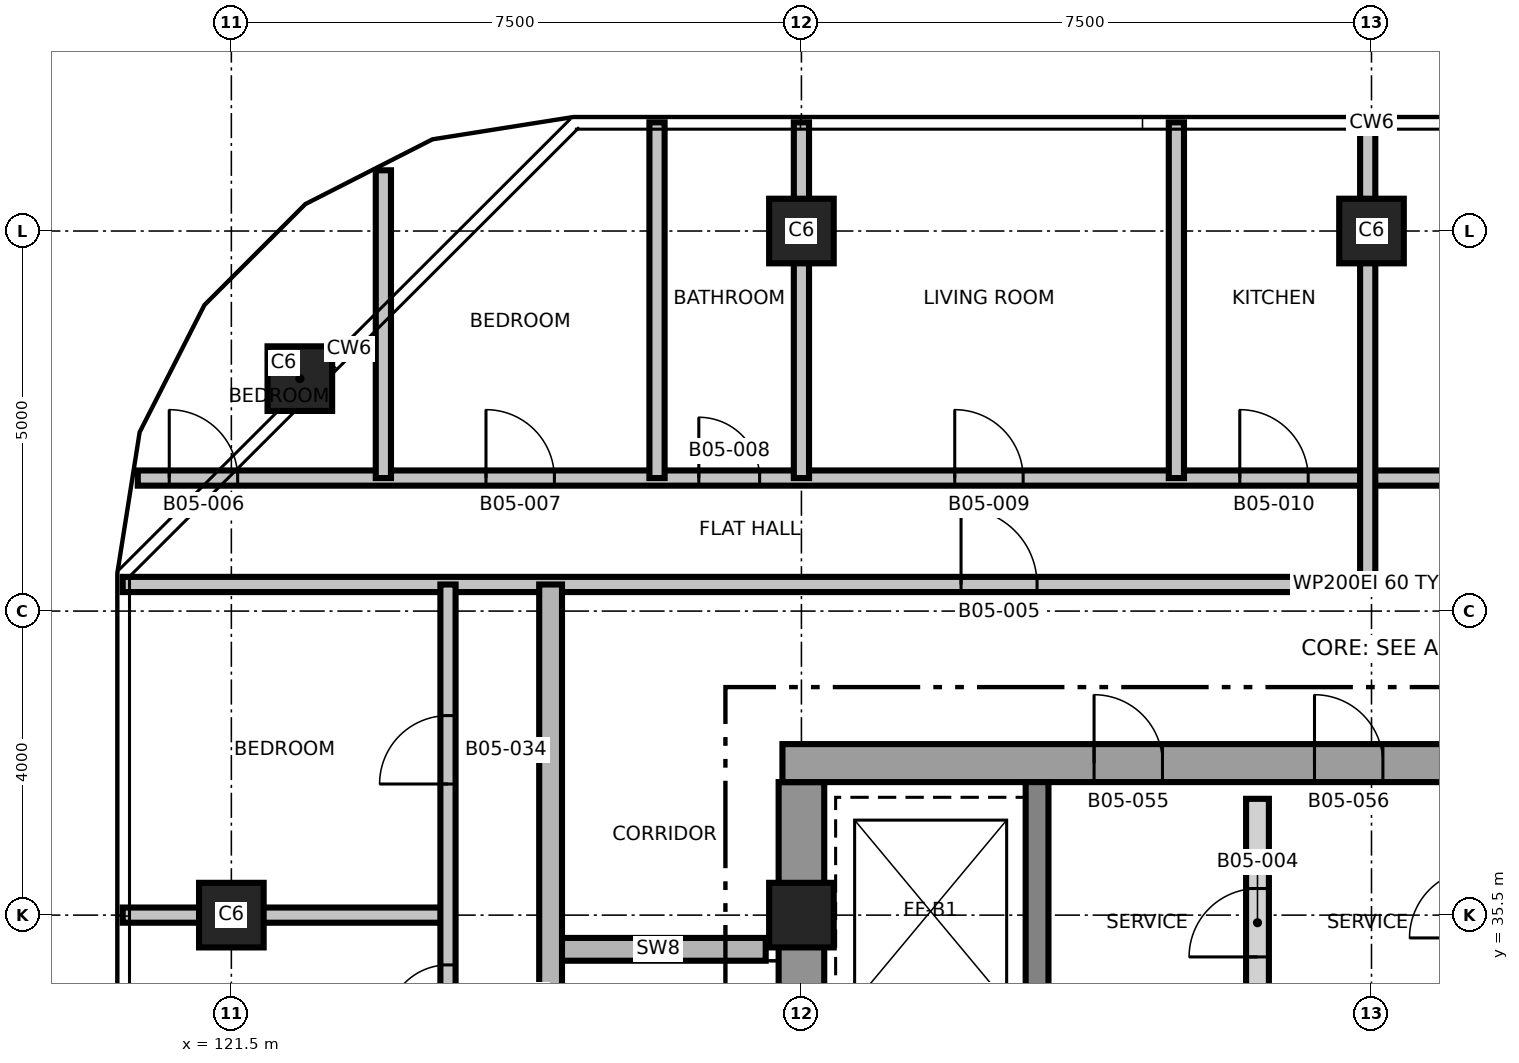
"""IFC4 building model, lengths in metres.
Left out: names, types, materials, properties, quantities, classifications, styles, units other than length and angle.
Written with IfcOpenShell. Run it as: python <this file> out.ifc"""

import sys

from ifc_helpers import new_model, si_unit, direction, frame, frame_2d, origin, origin_2d, place, context, subcontext, project, spatial, rectangle, extrude, element, fill, save


model = new_model("IFC4")
c1 = context("Model", 3, precision=1e-05, world=origin(), true_north=direction((0.0, 1.0)))
c2 = subcontext(c1, "Body", "Model", "MODEL_VIEW")
j1 = project(units=[si_unit("LENGTHUNIT", "METRE"), si_unit("PLANEANGLEUNIT", "RADIAN")], contexts=[c1])
p1 = place(None, origin())
s1 = spatial("IfcSite", under=j1, at=p1, CompositionType="ELEMENT")
p2 = place(p1, origin())
s2 = spatial("IfcBuilding", under=s1, at=p2, CompositionType="ELEMENT")
p3 = place(p2, frame((0.0, 0.0, 74.2)))
s3 = spatial("IfcBuildingStorey", under=s2, at=p3, CompositionType="ELEMENT", Elevation=74.2)
p4 = place(p3, frame((129.0, 24.75, 0.0), z_axis=(0.0, 0.0, 1.0), x_axis=(0.0, 1.0, 0.0)))
e1 = element("IfcWall", 1, at=p4, inside=s3, PredefinedType="SHEAR", context=c2, shape_type="SweptSolid", body=[
    extrude(rectangle(XDim=12.5, YDim=0.6, at=frame_2d((6.25, 0.0))), origin(), (0.0, 0.0, 1.0), 3.7),
])
p5 = place(p4, frame((5.15, 0.0, 0.0)))
e2 = element("IfcOpeningElement", 2, at=p5, cuts=e1, PredefinedType="OPENING", context=c2, shape_type="SweptSolid", body=[
    extrude(rectangle(XDim=1.0, YDim=2.1, at=frame_2d((0.5, 1.05))), frame((0.0, 0.31, 0.0), z_axis=(0.0, -1.0, 0.0), x_axis=(1.0, 0.0, 0.0)), (0.0, 0.0, 1.0), 0.62),
])
p6 = place(p3, frame((128.75, 37.5, 0.0), z_axis=(0.0, 0.0, 1.0), x_axis=(1.0, 0.0, 0.0)))
e3 = element("IfcWall", 3, at=p6, inside=s3, PredefinedType="SHEAR", context=c2, shape_type="SweptSolid", body=[
    extrude(rectangle(XDim=15.0, YDim=0.5, at=frame_2d((7.5, 0.0))), origin(), (0.0, 0.0, 1.0), 3.7),
])
p7 = place(p6, frame((9.65, 0.0, 0.0)))
e4 = element("IfcOpeningElement", 4, at=p7, cuts=e3, PredefinedType="OPENING", context=c2, shape_type="SweptSolid", body=[
    extrude(rectangle(XDim=1.5, YDim=2.1, at=frame_2d((0.75, 1.05))), frame((0.0, 0.26, 0.0), z_axis=(0.0, -1.0, 0.0), x_axis=(1.0, 0.0, 0.0)), (0.0, 0.0, 1.0), 0.52),
])
p8 = place(p6, frame((12.85, 0.0, 0.0)))
e5 = element("IfcOpeningElement", 5, at=p8, cuts=e3, PredefinedType="OPENING", context=c2, shape_type="SweptSolid", body=[
    extrude(rectangle(XDim=0.9, YDim=2.1, at=frame_2d((0.45, 1.05))), frame((0.0, 0.26, 0.0), z_axis=(0.0, -1.0, 0.0), x_axis=(1.0, 0.0, 0.0)), (0.0, 0.0, 1.0), 0.52),
])
p9 = place(p6, frame((4.1, 0.0, 0.0)))
e6 = element("IfcOpeningElement", 6, at=p9, cuts=e3, PredefinedType="OPENING", context=c2, shape_type="SweptSolid", body=[
    extrude(rectangle(XDim=0.9, YDim=2.1, at=frame_2d((0.45, 1.05))), frame((0.0, 0.26, 0.0), z_axis=(0.0, -1.0, 0.0), x_axis=(1.0, 0.0, 0.0)), (0.0, 0.0, 1.0), 0.52),
])
p10 = place(p6, frame((7.0, 0.0, 0.0)))
e7 = element("IfcOpeningElement", 7, at=p10, cuts=e3, PredefinedType="OPENING", context=c2, shape_type="SweptSolid", body=[
    extrude(rectangle(XDim=0.9, YDim=2.1, at=frame_2d((0.45, 1.05))), frame((0.0, 0.26, 0.0), z_axis=(0.0, -1.0, 0.0), x_axis=(1.0, 0.0, 0.0)), (0.0, 0.0, 1.0), 0.52),
])
p11 = place(p3, frame((132.1, 24.75, 0.0), z_axis=(0.0, 0.0, 1.0), x_axis=(0.0, 1.0, 0.0)))
e8 = element("IfcWall", 8, at=p11, inside=s3, PredefinedType="SHEAR", context=c2, shape_type="SweptSolid", body=[
    extrude(rectangle(XDim=12.5, YDim=0.3, at=frame_2d((6.25, 0.0))), origin(), (0.0, 0.0, 1.0), 3.7),
])
p12 = place(p11, frame((3.9, 0.0, 0.0)))
e9 = element("IfcOpeningElement", 9, at=p12, cuts=e8, PredefinedType="OPENING", context=c2, shape_type="SweptSolid", body=[
    extrude(rectangle(XDim=1.2, YDim=2.1, at=frame_2d((0.6, 1.05))), frame((0.0, 0.16, 0.0), z_axis=(0.0, -1.0, 0.0), x_axis=(1.0, 0.0, 0.0)), (0.0, 0.0, 1.0), 0.32),
])
for number, where, z_axis, x_axis in (
    (10, (121.5, 35.5, 0.0), (0.0, 0.0, 1.0), (1.0, 0.0, 0.0)),
    (11, (129.0, 35.5, 0.0), (0.0, 0.0, 1.0), (1.0, 0.0, 0.0)),
    (12, (122.401, 42.558, 0.0), (0.0, 0.0, 1.0), (1.0, 0.0, 0.0)),
    (13, (129.0, 44.5, 0.0), (0.0, 0.0, 1.0), (1.0, 0.0, 0.0)),
    (14, (136.5, 44.5, 0.0), (0.0, 0.0, 1.0), (1.0, 0.0, 0.0)),
):
    element("IfcColumn", number, at=place(p3, frame(where, z_axis=z_axis, x_axis=x_axis)), inside=s3, PredefinedType="COLUMN", context=c2, shape_type="SweptSolid", body=[
        extrude(rectangle(XDim=0.85, YDim=0.85, at=origin_2d()), origin(), (0.0, 0.0, 1.0), 3.7),
    ])
p13 = place(p3, frame((125.7, 35.05, 0.0), z_axis=(0.0, 0.0, 1.0), x_axis=(1.0, 0.0, 0.0)))
e15 = element("IfcWall", 15, at=p13, inside=s3, PredefinedType="SHEAR", context=c2, shape_type="SweptSolid", body=[
    extrude(rectangle(XDim=2.83, YDim=0.3, at=frame_2d((1.415, 0.0))), origin(), (0.0, 0.0, 1.0), 3.4),
])
p14 = place(p3, frame((120.07, 35.5, 0.0), z_axis=(0.0, 0.0, 1.0), x_axis=(1.0, 0.0, 0.0)))
e16 = element("IfcWall", 16, at=p14, inside=s3, PredefinedType="PARTITIONING", context=c2, shape_type="SweptSolid", body=[
    extrude(rectangle(XDim=4.28, YDim=0.2, at=frame_2d((2.14, 0.0))), origin(), (0.0, 0.0, 1.0), 3.4),
])
p15 = place(p3, frame((120.07, 39.85, 0.0), z_axis=(0.0, 0.0, 1.0), x_axis=(1.0, 0.0, 0.0)))
e17 = element("IfcWall", 17, at=p15, inside=s3, PredefinedType="PARTITIONING", context=c2, shape_type="SweptSolid", body=[
    extrude(rectangle(XDim=32.86, YDim=0.2, at=frame_2d((16.43, 0.0))), origin(), (0.0, 0.0, 1.0), 3.4),
])
p16 = place(p15, frame((11.03, 0.0, 0.0)))
e18 = element("IfcOpeningElement", 18, at=p16, cuts=e17, PredefinedType="OPENING", context=c2, shape_type="SweptSolid", body=[
    extrude(rectangle(XDim=1.0, YDim=2.1, at=frame_2d((0.5, 1.05))), frame((0.0, 0.11, 0.0), z_axis=(0.0, -1.0, 0.0), x_axis=(1.0, 0.0, 0.0)), (0.0, 0.0, 1.0), 0.22),
])
p17 = place(p15, frame((20.83, 0.0, 0.0)))
e19 = element("IfcOpeningElement", 19, at=p17, cuts=e17, PredefinedType="OPENING", context=c2, shape_type="SweptSolid", body=[
    extrude(rectangle(XDim=1.0, YDim=2.1, at=frame_2d((0.5, 1.05))), frame((0.0, 0.11, 0.0), z_axis=(0.0, -1.0, 0.0), x_axis=(1.0, 0.0, 0.0)), (0.0, 0.0, 1.0), 0.22),
])
p18 = place(p3, frame((120.269, 41.25, 0.0), z_axis=(0.0, 0.0, 1.0), x_axis=(1.0, 0.0, 0.0)))
e20 = element("IfcWall", 20, at=p18, inside=s3, PredefinedType="PARTITIONING", context=c2, shape_type="SweptSolid", body=[
    extrude(rectangle(XDim=32.462, YDim=0.2, at=frame_2d((16.231, 0.0))), origin(), (0.0, 0.0, 1.0), 3.4),
])
p19 = place(p18, frame((0.414, 0.0, 0.0)))
e21 = element("IfcOpeningElement", 21, at=p19, cuts=e20, PredefinedType="OPENING", context=c2, shape_type="SweptSolid", body=[
    extrude(rectangle(XDim=0.9, YDim=2.1, at=frame_2d((0.45, 1.05))), frame((0.0, 0.11, 0.0), z_axis=(0.0, -1.0, 0.0), x_axis=(1.0, 0.0, 0.0)), (0.0, 0.0, 1.0), 0.22),
])
p20 = place(p18, frame((4.581, 0.0, 0.0)))
e22 = element("IfcOpeningElement", 22, at=p20, cuts=e20, PredefinedType="OPENING", context=c2, shape_type="SweptSolid", body=[
    extrude(rectangle(XDim=0.9, YDim=2.1, at=frame_2d((0.45, 1.05))), frame((0.0, 0.11, 0.0), z_axis=(0.0, -1.0, 0.0), x_axis=(1.0, 0.0, 0.0)), (0.0, 0.0, 1.0), 0.22),
])
p21 = place(p18, frame((7.381, 0.0, 0.0)))
e23 = element("IfcOpeningElement", 23, at=p21, cuts=e20, PredefinedType="OPENING", context=c2, shape_type="SweptSolid", body=[
    extrude(rectangle(XDim=0.8, YDim=2.1, at=frame_2d((0.4, 1.05))), frame((0.0, 0.11, 0.0), z_axis=(0.0, -1.0, 0.0), x_axis=(1.0, 0.0, 0.0)), (0.0, 0.0, 1.0), 0.22),
])
p22 = place(p18, frame((10.748, 0.0, 0.0)))
e24 = element("IfcOpeningElement", 24, at=p22, cuts=e20, PredefinedType="OPENING", context=c2, shape_type="SweptSolid", body=[
    extrude(rectangle(XDim=0.9, YDim=2.1, at=frame_2d((0.45, 1.05))), frame((0.0, 0.11, 0.0), z_axis=(0.0, -1.0, 0.0), x_axis=(1.0, 0.0, 0.0)), (0.0, 0.0, 1.0), 0.22),
])
p23 = place(p18, frame((14.498, 0.0, 0.0)))
e25 = element("IfcOpeningElement", 25, at=p23, cuts=e20, PredefinedType="OPENING", context=c2, shape_type="SweptSolid", body=[
    extrude(rectangle(XDim=0.9, YDim=2.1, at=frame_2d((0.45, 1.05))), frame((0.0, 0.11, 0.0), z_axis=(0.0, -1.0, 0.0), x_axis=(1.0, 0.0, 0.0)), (0.0, 0.0, 1.0), 0.22),
])
p24 = place(p18, frame((18.248, 0.0, 0.0)))
e26 = element("IfcOpeningElement", 26, at=p24, cuts=e20, PredefinedType="OPENING", context=c2, shape_type="SweptSolid", body=[
    extrude(rectangle(XDim=0.9, YDim=2.1, at=frame_2d((0.45, 1.05))), frame((0.0, 0.11, 0.0), z_axis=(0.0, -1.0, 0.0), x_axis=(1.0, 0.0, 0.0)), (0.0, 0.0, 1.0), 0.22),
])
p25 = place(p18, frame((21.998, 0.0, 0.0)))
e27 = element("IfcOpeningElement", 27, at=p25, cuts=e20, PredefinedType="OPENING", context=c2, shape_type="SweptSolid", body=[
    extrude(rectangle(XDim=0.9, YDim=2.1, at=frame_2d((0.45, 1.05))), frame((0.0, 0.11, 0.0), z_axis=(0.0, -1.0, 0.0), x_axis=(1.0, 0.0, 0.0)), (0.0, 0.0, 1.0), 0.22),
])
p26 = place(p18, frame((24.842, 0.0, 0.0)))
e28 = element("IfcOpeningElement", 28, at=p26, cuts=e20, PredefinedType="OPENING", context=c2, shape_type="SweptSolid", body=[
    extrude(rectangle(XDim=0.8, YDim=2.1, at=frame_2d((0.4, 1.05))), frame((0.0, 0.11, 0.0), z_axis=(0.0, -1.0, 0.0), x_axis=(1.0, 0.0, 0.0)), (0.0, 0.0, 1.0), 0.22),
])
p27 = place(p18, frame((28.659, 0.0, 0.0)))
e29 = element("IfcOpeningElement", 29, at=p27, cuts=e20, PredefinedType="OPENING", context=c2, shape_type="SweptSolid", body=[
    extrude(rectangle(XDim=0.9, YDim=2.1, at=frame_2d((0.45, 1.05))), frame((0.0, 0.11, 0.0), z_axis=(0.0, -1.0, 0.0), x_axis=(1.0, 0.0, 0.0)), (0.0, 0.0, 1.0), 0.22),
])
p28 = place(p3, frame((123.5, 41.25, 0.0), z_axis=(0.0, 0.0, 1.0), x_axis=(0.0, 1.0, 0.0)))
e30 = element("IfcWall", 30, at=p28, inside=s3, PredefinedType="PARTITIONING", context=c2, shape_type="SweptSolid", body=[
    extrude(rectangle(XDim=4.049, YDim=0.2, at=frame_2d((2.024, 0.0))), origin(), (0.0, 0.0, 1.0), 3.4),
])
p29 = place(p3, frame((124.35, 22.15, 0.0), z_axis=(0.0, 0.0, 1.0), x_axis=(0.0, 1.0, 0.0)))
e31 = element("IfcWall", 31, at=p29, inside=s3, PredefinedType="PARTITIONING", context=c2, shape_type="SweptSolid", body=[
    extrude(rectangle(XDim=17.7, YDim=0.2, at=frame_2d((8.85, 0.0))), origin(), (0.0, 0.0, 1.0), 3.4),
])
p30 = place(p29, frame((1.028, 0.0, 0.0)))
e32 = element("IfcOpeningElement", 32, at=p30, cuts=e31, PredefinedType="OPENING", context=c2, shape_type="SweptSolid", body=[
    extrude(rectangle(XDim=0.9, YDim=2.1, at=frame_2d((0.45, 1.05))), frame((0.0, 0.11, 0.0), z_axis=(0.0, -1.0, 0.0), x_axis=(1.0, 0.0, 0.0)), (0.0, 0.0, 1.0), 0.22),
])
p31 = place(p29, frame((3.253, 0.0, 0.0)))
e33 = element("IfcOpeningElement", 33, at=p31, cuts=e31, PredefinedType="OPENING", context=c2, shape_type="SweptSolid", body=[
    extrude(rectangle(XDim=0.8, YDim=2.1, at=frame_2d((0.4, 1.05))), frame((0.0, 0.11, 0.0), z_axis=(0.0, -1.0, 0.0), x_axis=(1.0, 0.0, 0.0)), (0.0, 0.0, 1.0), 0.22),
])
p32 = place(p29, frame((6.195, 0.0, 0.0)))
e34 = element("IfcOpeningElement", 34, at=p32, cuts=e31, PredefinedType="OPENING", context=c2, shape_type="SweptSolid", body=[
    extrude(rectangle(XDim=0.9, YDim=2.1, at=frame_2d((0.45, 1.05))), frame((0.0, 0.11, 0.0), z_axis=(0.0, -1.0, 0.0), x_axis=(1.0, 0.0, 0.0)), (0.0, 0.0, 1.0), 0.22),
])
p33 = place(p29, frame((9.641, 0.0, 0.0)))
e35 = element("IfcOpeningElement", 35, at=p33, cuts=e31, PredefinedType="OPENING", context=c2, shape_type="SweptSolid", body=[
    extrude(rectangle(XDim=0.9, YDim=2.1, at=frame_2d((0.45, 1.05))), frame((0.0, 0.11, 0.0), z_axis=(0.0, -1.0, 0.0), x_axis=(1.0, 0.0, 0.0)), (0.0, 0.0, 1.0), 0.22),
])
p34 = place(p29, frame((11.895, 0.0, 0.0)))
e36 = element("IfcOpeningElement", 36, at=p34, cuts=e31, PredefinedType="OPENING", context=c2, shape_type="SweptSolid", body=[
    extrude(rectangle(XDim=0.8, YDim=2.1, at=frame_2d((0.4, 1.05))), frame((0.0, 0.11, 0.0), z_axis=(0.0, -1.0, 0.0), x_axis=(1.0, 0.0, 0.0)), (0.0, 0.0, 1.0), 0.22),
])
p35 = place(p29, frame((15.075, 0.0, 0.0)))
e37 = element("IfcOpeningElement", 37, at=p35, cuts=e31, PredefinedType="OPENING", context=c2, shape_type="SweptSolid", body=[
    extrude(rectangle(XDim=0.9, YDim=2.1, at=frame_2d((0.45, 1.05))), frame((0.0, 0.11, 0.0), z_axis=(0.0, -1.0, 0.0), x_axis=(1.0, 0.0, 0.0)), (0.0, 0.0, 1.0), 0.22),
])
p36 = place(p3, frame((125.7, 22.15, 0.0), z_axis=(0.0, 0.0, 1.0), x_axis=(0.0, 1.0, 0.0)))
e38 = element("IfcWall", 38, at=p36, inside=s3, PredefinedType="SHEAR", context=c2, shape_type="SweptSolid", body=[
    extrude(rectangle(XDim=17.7, YDim=0.3, at=frame_2d((8.85, 0.0))), origin(), (0.0, 0.0, 1.0), 3.4),
])
p37 = place(p36, frame((2.7, 0.0, 0.0)))
e39 = element("IfcOpeningElement", 39, at=p37, cuts=e38, PredefinedType="OPENING", context=c2, shape_type="SweptSolid", body=[
    extrude(rectangle(XDim=1.0, YDim=2.1, at=frame_2d((0.5, 1.05))), frame((0.0, 0.16, 0.0), z_axis=(0.0, -1.0, 0.0), x_axis=(1.0, 0.0, 0.0)), (0.0, 0.0, 1.0), 0.32),
])
for number, where, z_axis, x_axis in (
    (40, (127.1, 41.25, 0.0), (0.0, 0.0, 1.0), (0.0, 1.0, 0.0)),
    (41, (129.0, 41.25, 0.0), (0.0, 0.0, 1.0), (0.0, 1.0, 0.0)),
    (42, (133.933, 41.25, 0.0), (0.0, 0.0, 1.0), (0.0, 1.0, 0.0)),
):
    element("IfcWall", number, at=place(p3, frame(where, z_axis=z_axis, x_axis=x_axis)), inside=s3, PredefinedType="PARTITIONING", context=c2, shape_type="SweptSolid", body=[
        extrude(rectangle(XDim=4.68, YDim=0.2, at=frame_2d((2.34, 0.0))), origin(), (0.0, 0.0, 1.0), 3.4),
    ])
p38 = place(p3, frame((135.0, 33.77, 0.0), z_axis=(0.0, 0.0, 1.0), x_axis=(0.0, 1.0, 0.0)))
e43 = element("IfcWall", 43, at=p38, inside=s3, PredefinedType="PARTITIONING", context=c2, shape_type="SweptSolid", body=[
    extrude(rectangle(XDim=3.26, YDim=0.3, at=frame_2d((1.63, 0.0))), origin(), (0.0, 0.0, 1.0), 3.4),
])
p39 = place(p38, frame((1.18, 0.0, 0.0)))
e44 = element("IfcOpeningElement", 44, at=p39, cuts=e43, PredefinedType="OPENING", context=c2, shape_type="SweptSolid", body=[
    extrude(rectangle(XDim=0.9, YDim=2.1, at=frame_2d((0.45, 1.05))), frame((0.0, 0.16, 0.0), z_axis=(0.0, -1.0, 0.0), x_axis=(1.0, 0.0, 0.0)), (0.0, 0.0, 1.0), 0.32),
])
p40 = place(p3, frame((136.45, 39.85, 0.0), z_axis=(0.0, 0.0, 1.0), x_axis=(0.0, 1.0, 0.0)))
e45 = element("IfcWall", 45, at=p40, inside=s3, PredefinedType="PARTITIONING", context=c2, shape_type="SweptSolid", body=[
    extrude(rectangle(XDim=6.08, YDim=0.2, at=frame_2d((3.04, 0.0))), origin(), (0.0, 0.0, 1.0), 3.4),
])
p41 = place(p39, origin())
e46 = element("IfcDoor", 46, at=p41, inside=s3, OperationType="SINGLE_SWING_RIGHT", PredefinedType="DOOR", context=c2, shape_type="SweptSolid", body=[
    extrude(rectangle(XDim=0.9, YDim=2.1, at=frame_2d((0.45, 1.05))), frame((0.0, 0.025, 0.0), z_axis=(0.0, -1.0, 0.0), x_axis=(1.0, 0.0, 0.0)), (0.0, 0.0, 1.0), 0.05),
])
fill(e44, e46)
p42 = place(p16, origin())
e47 = element("IfcDoor", 47, at=p42, inside=s3, OperationType="SINGLE_SWING_LEFT", PredefinedType="DOOR", context=c2, shape_type="SweptSolid", body=[
    extrude(rectangle(XDim=1.0, YDim=2.1, at=frame_2d((0.5, 1.05))), frame((0.0, 0.025, 0.0), z_axis=(0.0, -1.0, 0.0), x_axis=(1.0, 0.0, 0.0)), (0.0, 0.0, 1.0), 0.05),
])
fill(e18, e47)
p43 = place(p19, origin())
e48 = element("IfcDoor", 48, at=p43, inside=s3, OperationType="SINGLE_SWING_RIGHT", PredefinedType="DOOR", context=c2, shape_type="SweptSolid", body=[
    extrude(rectangle(XDim=0.9, YDim=2.1, at=frame_2d((0.45, 1.05))), frame((0.0, 0.025, 0.0), z_axis=(0.0, -1.0, 0.0), x_axis=(1.0, 0.0, 0.0)), (0.0, 0.0, 1.0), 0.05),
])
fill(e21, e48)
p44 = place(p20, origin())
e49 = element("IfcDoor", 49, at=p44, inside=s3, OperationType="SINGLE_SWING_LEFT", PredefinedType="DOOR", context=c2, shape_type="SweptSolid", body=[
    extrude(rectangle(XDim=0.9, YDim=2.1, at=frame_2d((0.45, 1.05))), frame((0.0, 0.025, 0.0), z_axis=(0.0, -1.0, 0.0), x_axis=(1.0, 0.0, 0.0)), (0.0, 0.0, 1.0), 0.05),
])
fill(e22, e49)
p45 = place(p21, origin())
e50 = element("IfcDoor", 50, at=p45, inside=s3, OperationType="SINGLE_SWING_RIGHT", PredefinedType="DOOR", context=c2, shape_type="SweptSolid", body=[
    extrude(rectangle(XDim=0.8, YDim=2.1, at=frame_2d((0.4, 1.05))), frame((0.0, 0.025, 0.0), z_axis=(0.0, -1.0, 0.0), x_axis=(1.0, 0.0, 0.0)), (0.0, 0.0, 1.0), 0.05),
])
fill(e23, e50)
p46 = place(p22, origin())
e51 = element("IfcDoor", 51, at=p46, inside=s3, OperationType="SINGLE_SWING_LEFT", PredefinedType="DOOR", context=c2, shape_type="SweptSolid", body=[
    extrude(rectangle(XDim=0.9, YDim=2.1, at=frame_2d((0.45, 1.05))), frame((0.0, 0.025, 0.0), z_axis=(0.0, -1.0, 0.0), x_axis=(1.0, 0.0, 0.0)), (0.0, 0.0, 1.0), 0.05),
])
fill(e24, e51)
p47 = place(p23, origin())
e52 = element("IfcDoor", 52, at=p47, inside=s3, OperationType="SINGLE_SWING_RIGHT", PredefinedType="DOOR", context=c2, shape_type="SweptSolid", body=[
    extrude(rectangle(XDim=0.9, YDim=2.1, at=frame_2d((0.45, 1.05))), frame((0.0, 0.025, 0.0), z_axis=(0.0, -1.0, 0.0), x_axis=(1.0, 0.0, 0.0)), (0.0, 0.0, 1.0), 0.05),
])
fill(e25, e52)
p48 = place(p34, origin())
e53 = element("IfcDoor", 53, at=p48, inside=s3, OperationType="SINGLE_SWING_LEFT", PredefinedType="DOOR", context=c2, shape_type="SweptSolid", body=[
    extrude(rectangle(XDim=0.8, YDim=2.1, at=frame_2d((0.4, 1.05))), frame((0.0, 0.025, 0.0), z_axis=(0.0, -1.0, 0.0), x_axis=(1.0, 0.0, 0.0)), (0.0, 0.0, 1.0), 0.05),
])
fill(e36, e53)
p49 = place(p35, origin())
e54 = element("IfcDoor", 54, at=p49, inside=s3, OperationType="SINGLE_SWING_RIGHT", PredefinedType="DOOR", context=c2, shape_type="SweptSolid", body=[
    extrude(rectangle(XDim=0.9, YDim=2.1, at=frame_2d((0.45, 1.05))), frame((0.0, 0.025, 0.0), z_axis=(0.0, -1.0, 0.0), x_axis=(1.0, 0.0, 0.0)), (0.0, 0.0, 1.0), 0.05),
])
fill(e37, e54)
p50 = place(p9, origin())
e55 = element("IfcDoor", 55, at=p50, inside=s3, OperationType="SINGLE_SWING_LEFT", PredefinedType="DOOR", context=c2, shape_type="SweptSolid", body=[
    extrude(rectangle(XDim=0.9, YDim=2.1, at=frame_2d((0.45, 1.05))), frame((0.0, 0.025, 0.0), z_axis=(0.0, -1.0, 0.0), x_axis=(1.0, 0.0, 0.0)), (0.0, 0.0, 1.0), 0.05),
])
fill(e6, e55)
p51 = place(p10, origin())
e56 = element("IfcDoor", 56, at=p51, inside=s3, OperationType="SINGLE_SWING_RIGHT", PredefinedType="DOOR", context=c2, shape_type="SweptSolid", body=[
    extrude(rectangle(XDim=0.9, YDim=2.1, at=frame_2d((0.45, 1.05))), frame((0.0, 0.025, 0.0), z_axis=(0.0, -1.0, 0.0), x_axis=(1.0, 0.0, 0.0)), (0.0, 0.0, 1.0), 0.05),
])
fill(e7, e56)
save(model, sys.argv[1])
